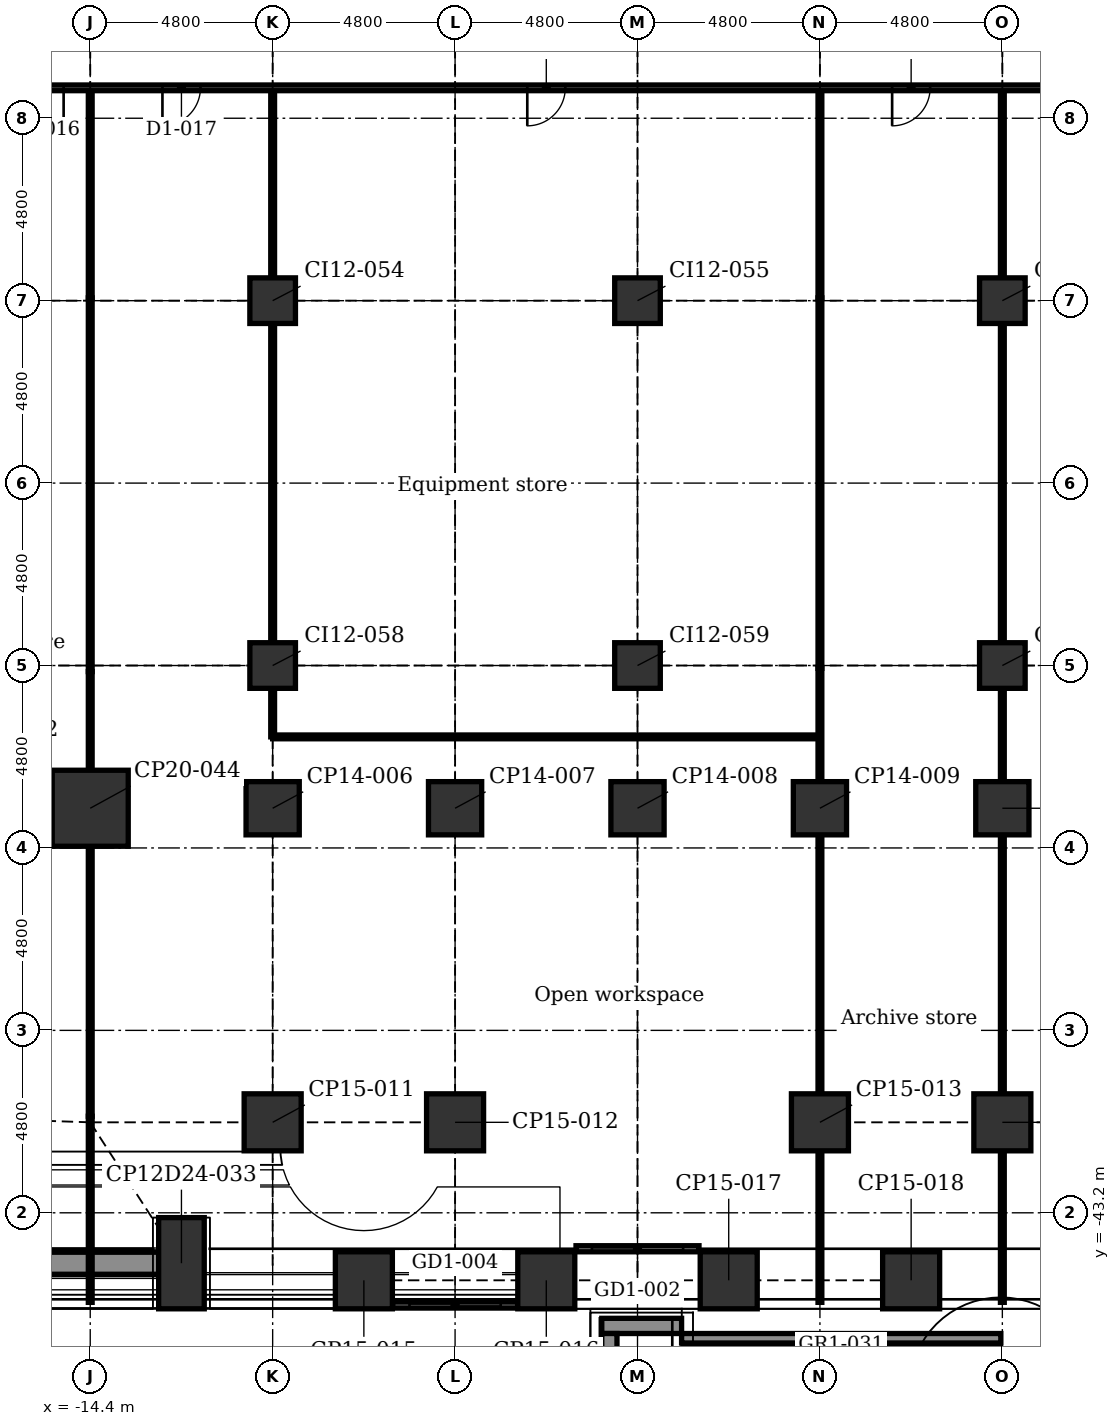
"""IFC4 building model, lengths in metres.
Left out: names, types, materials, properties, quantities, classifications, styles, units other than length and angle.
Written with IfcOpenShell. Run it as: python <this file> out.ifc"""

import sys

from ifc_helpers import new_model, si_unit, direction, frame, frame_2d, origin, origin_2d, place, context, subcontext, project, spatial, polyline, rectangle, outline, extrude, element, fill, save


model = new_model("IFC4")
c1 = context("Model", 3, precision=1e-05, world=origin(), true_north=direction((0.0, 1.0)))
c2 = subcontext(c1, "Body", "Model", "MODEL_VIEW")
j1 = project(units=[si_unit("LENGTHUNIT", "METRE"), si_unit("PLANEANGLEUNIT", "RADIAN")], contexts=[c1])
p1 = place(None, origin())
s1 = spatial("IfcSite", under=j1, at=p1, CompositionType="ELEMENT")
p2 = place(p1, origin())
s2 = spatial("IfcBuilding", under=s1, at=p2, CompositionType="ELEMENT")
p3 = place(p2, frame((0.0, 0.0, 7.0)))
s3 = spatial("IfcBuildingStorey", under=s2, at=p3, CompositionType="ELEMENT", Elevation=7.0)
for number, where, z_axis, x_axis in (
    (1, (7.2, -44.976, -0.3), (0.0, 0.0, 1.0), (1.0, 0.0, 0.0)),
    (2, (2.4, -44.976, -0.3), (0.0, 0.0, 1.0), (1.0, 0.0, 0.0)),
    (3, (-2.4, -44.976, -0.3), (0.0, 0.0, 1.0), (1.0, 0.0, 0.0)),
    (4, (-7.2, -44.976, -0.3), (0.0, 0.0, 1.0), (1.0, 0.0, 0.0)),
):
    element("IfcColumn", number, at=place(p3, frame(where, z_axis=z_axis, x_axis=x_axis)), inside=s3, PredefinedType="COLUMN", context=c2, shape_type="SweptSolid", body=[
        extrude(rectangle(XDim=1.5, YDim=1.5, at=origin_2d()), origin(), (0.0, 0.0, 1.0), 5.4),
    ])
p4 = place(p3, frame((-12.0, -44.526, -0.3), z_axis=(0.0, 0.0, 1.0), x_axis=(1.0, 0.0, 0.0)))
e5 = element("IfcColumn", 5, at=p4, inside=s3, PredefinedType="COLUMN", context=c2, shape_type="SweptSolid", body=[
    extrude(rectangle(XDim=1.2, YDim=2.4, at=origin_2d()), origin(), (0.0, 0.0, 1.0), 5.4),
])
for number, where, z_axis, x_axis in (
    (6, (9.6, -40.819, -0.3), (0.0, 0.0, 1.0), (1.0, 0.0, 0.0)),
    (7, (4.8, -40.819, -0.3), (0.0, 0.0, 1.0), (1.0, 0.0, 0.0)),
    (8, (-4.8, -40.819, -0.3), (0.0, 0.0, 1.0), (1.0, 0.0, 0.0)),
    (9, (-9.6, -40.819, -0.3), (0.0, 0.0, 1.0), (1.0, 0.0, 0.0)),
):
    element("IfcColumn", number, at=place(p3, frame(where, z_axis=z_axis, x_axis=x_axis)), inside=s3, PredefinedType="COLUMN", context=c2, shape_type="SweptSolid", body=[
        extrude(rectangle(XDim=1.5, YDim=1.5, at=origin_2d()), origin(), (0.0, 0.0, 1.0), 5.4),
    ])
p5 = place(p3, frame((-14.4, -32.555, -0.3), z_axis=(0.0, 0.0, 1.0), x_axis=(1.0, 0.0, 0.0)))
e10 = element("IfcColumn", 10, at=p5, inside=s3, PredefinedType="COLUMN", context=c2, shape_type="SweptSolid", body=[
    extrude(rectangle(XDim=2.0, YDim=2.0, at=origin_2d()), origin(), (0.0, 0.0, 1.0), 5.4),
])
for number, where, z_axis, x_axis in (
    (11, (9.6, -32.555, -0.3), (0.0, 0.0, 1.0), (1.0, 0.0, 0.0)),
    (12, (4.8, -32.555, -0.3), (0.0, 0.0, 1.0), (1.0, 0.0, 0.0)),
    (13, (0.0, -32.555, -0.3), (0.0, 0.0, 1.0), (1.0, 0.0, 0.0)),
    (14, (-4.8, -32.555, -0.3), (0.0, 0.0, 1.0), (1.0, 0.0, 0.0)),
    (15, (-9.6, -32.555, -0.3), (0.0, 0.0, 1.0), (1.0, 0.0, 0.0)),
):
    element("IfcColumn", number, at=place(p3, frame(where, z_axis=z_axis, x_axis=x_axis)), inside=s3, PredefinedType="COLUMN", context=c2, shape_type="SweptSolid", body=[
        extrude(rectangle(XDim=1.4, YDim=1.4, at=origin_2d()), origin(), (0.0, 0.0, 1.0), 5.4),
    ])
for number, where, z_axis, x_axis in (
    (16, (-9.6, -28.8, -0.3), (0.0, 0.0, 1.0), (1.0, 0.0, 0.0)),
    (17, (-9.6, -19.2, -0.3), (0.0, 0.0, 1.0), (1.0, 0.0, 0.0)),
    (18, (0.0, -28.8, -0.3), (0.0, 0.0, 1.0), (1.0, 0.0, 0.0)),
    (19, (0.0, -19.2, -0.3), (0.0, 0.0, 1.0), (1.0, 0.0, 0.0)),
    (20, (9.6, -28.8, -0.3), (0.0, 0.0, 1.0), (1.0, 0.0, 0.0)),
    (21, (9.6, -19.2, -0.3), (0.0, 0.0, 1.0), (1.0, 0.0, 0.0)),
):
    element("IfcColumn", number, at=place(p3, frame(where, z_axis=z_axis, x_axis=x_axis)), inside=s3, PredefinedType="COLUMN", context=c2, shape_type="SweptSolid", body=[
        extrude(rectangle(XDim=1.2, YDim=1.2, at=origin_2d()), origin(), (0.0, 0.0, 1.0), 5.4),
    ])
p6 = place(p3, frame((1.618, -44.146, 0.0), z_axis=(0.0, 0.0, 1.0), x_axis=(-1.0, 0.0, 0.0)))
e22 = element("IfcWall", 22, at=p6, inside=s3, PredefinedType="PARTITIONING", context=c2, shape_type="SweptSolid", body=[
    extrude(rectangle(XDim=3.236, YDim=0.16, at=frame_2d((1.618, 0.0))), origin(), (0.0, 0.0, 1.0), 5.1),
])
p7 = place(p6, frame((0.418, 0.0, 0.0)))
e23 = element("IfcOpeningElement", 23, at=p7, cuts=e22, PredefinedType="OPENING", context=c2, shape_type="SweptSolid", body=[
    extrude(rectangle(XDim=2.4, YDim=2.4, at=frame_2d((1.2, 1.2))), frame((0.0, 0.09, 0.0), z_axis=(0.0, -1.0, 0.0), x_axis=(1.0, 0.0, 0.0)), (0.0, 0.0, 1.0), 0.18),
])
p8 = place(p3, frame((-3.154, -45.626, 0.0), z_axis=(0.0, 0.0, 1.0), x_axis=(-1.0, 0.0, 0.0)))
e24 = element("IfcWall", 24, at=p8, inside=s3, PredefinedType="PARTITIONING", context=c2, shape_type="SweptSolid", body=[
    extrude(rectangle(XDim=3.292, YDim=0.16, at=frame_2d((1.646, 0.0))), origin(), (0.0, 0.0, 1.0), 5.1),
])
p9 = place(p8, frame((0.446, 0.0, 0.0)))
e25 = element("IfcOpeningElement", 25, at=p9, cuts=e24, PredefinedType="OPENING", context=c2, shape_type="SweptSolid", body=[
    extrude(rectangle(XDim=2.4, YDim=2.4, at=frame_2d((1.2, 1.2))), frame((0.0, 0.09, 0.0), z_axis=(0.0, -1.0, 0.0), x_axis=(1.0, 0.0, 0.0)), (0.0, 0.0, 1.0), 0.18),
])
p10 = place(p3, frame((-12.294, -44.526, 5.4), z_axis=(0.0, 0.0, 1.0), x_axis=(-1.0, 0.0, 0.0)))
e26 = element("IfcWall", 26, at=p10, inside=s3, PredefinedType="USERDEFINED", context=c2, shape_type="SweptSolid", body=[
    extrude(rectangle(XDim=6.0, YDim=0.6, at=frame_2d((3.0, 0.0))), origin(), (0.0, 0.0, 1.0), 0.7),
])
p11 = place(p3, frame((9.56, -46.501, 0.0), z_axis=(0.0, 0.0, 1.0), x_axis=(-1.0, 0.0, 0.0)))
e27 = element("IfcWall", 27, at=p11, inside=s3, PredefinedType="SOLIDWALL", context=c2, shape_type="SweptSolid", body=[
    extrude(outline(polyline([(0.0, 0.0), (8.4, 0.0), (8.4, 5.5), (0.0, 0.274), (0.0, 0.0)])), frame((0.0, 0.125, 0.0), z_axis=(0.0, -1.0, 0.0), x_axis=(1.0, 0.0, 0.0)), (0.0, 0.0, 1.0), 0.25),
])
p12 = place(p3, frame((1.16, -46.176, 0.45), z_axis=(0.0, 0.0, 1.0), x_axis=(-1.0, 0.0, 0.0)))
e28 = element("IfcWall", 28, at=p12, inside=s3, PredefinedType="SOLIDWALL", context=c2, shape_type="SweptSolid", body=[
    extrude(rectangle(XDim=2.1, YDim=0.4, at=frame_2d((1.05, 0.0))), origin(), (0.0, 0.0, 1.0), 4.75),
])
p13 = place(p3, frame((-0.74, -46.376, 0.45), z_axis=(0.0, 0.0, 1.0), x_axis=(0.0, -1.0, 0.0)))
e29 = element("IfcWall", 29, at=p13, inside=s3, PredefinedType="SOLIDWALL", context=c2, shape_type="SweptSolid", body=[
    extrude(rectangle(XDim=2.25, YDim=0.4, at=frame_2d((1.125, 0.0))), origin(), (0.0, 0.0, 1.0), 4.75),
])
p14 = place(p3, frame((9.6, -28.24, 0.0), z_axis=(0.0, 0.0, 1.0), x_axis=(0.0, 1.0, 0.0)))
e30 = element("IfcWall", 30, at=p14, inside=s3, PredefinedType="PARTITIONING", context=c2, shape_type="SweptSolid", body=[
    extrude(rectangle(XDim=8.48, YDim=0.1, at=frame_2d((4.24, 0.0))), origin(), (0.0, 0.0, 1.0), 4.693),
])
p15 = place(p3, frame((9.6, -45.556, 0.0), z_axis=(0.0, 0.0, 1.0), x_axis=(0.0, 1.0, 0.0)))
e31 = element("IfcWall", 31, at=p15, inside=s3, PredefinedType="PARTITIONING", context=c2, shape_type="SweptSolid", body=[
    extrude(rectangle(XDim=5.447, YDim=0.1, at=frame_2d((2.724, 0.0))), origin(), (0.0, 0.0, 1.0), 5.1),
])
p16 = place(p3, frame((9.6, -40.109, 0.0), z_axis=(0.0, 0.0, 1.0), x_axis=(0.0, 1.0, 0.0)))
e32 = element("IfcWall", 32, at=p16, inside=s3, PredefinedType="PARTITIONING", context=c2, shape_type="SweptSolid", body=[
    extrude(rectangle(XDim=6.894, YDim=0.1, at=frame_2d((3.447, 0.0))), origin(), (0.0, 0.0, 1.0), 4.79),
])
p17 = place(p3, frame((9.6, -33.215, 0.0), z_axis=(0.0, 0.0, 1.0), x_axis=(0.0, 1.0, 0.0)))
e33 = element("IfcWall", 33, at=p17, inside=s3, PredefinedType="PARTITIONING", context=c2, shape_type="SweptSolid", body=[
    extrude(rectangle(XDim=1.32, YDim=0.1, at=frame_2d((0.66, 0.0))), origin(), (0.0, 0.0, 1.0), 5.1),
])
p18 = place(p3, frame((9.6, -31.896, 0.0), z_axis=(0.0, 0.0, 1.0), x_axis=(0.0, 1.0, 0.0)))
e34 = element("IfcWall", 34, at=p18, inside=s3, PredefinedType="PARTITIONING", context=c2, shape_type="SweptSolid", body=[
    extrude(rectangle(XDim=2.535, YDim=0.1, at=frame_2d((1.268, 0.0))), origin(), (0.0, 0.0, 1.0), 4.79),
])
for number, where, z_axis, x_axis in (
    (35, (9.6, -29.36, 0.0), (0.0, 0.0, 1.0), (0.0, 1.0, 0.0)),
    (36, (9.6, -19.76, 0.0), (0.0, 0.0, 1.0), (0.0, 1.0, 0.0)),
):
    element("IfcWall", number, at=place(p3, frame(where, z_axis=z_axis, x_axis=x_axis)), inside=s3, PredefinedType="PARTITIONING", context=c2, shape_type="SweptSolid", body=[
        extrude(rectangle(XDim=1.12, YDim=0.1, at=frame_2d((0.56, 0.0))), origin(), (0.0, 0.0, 1.0), 5.1),
    ])
p19 = place(p3, frame((9.6, -18.64, 0.0), z_axis=(0.0, 0.0, 1.0), x_axis=(0.0, 1.0, 0.0)))
e37 = element("IfcWall", 37, at=p19, inside=s3, PredefinedType="PARTITIONING", context=c2, shape_type="SweptSolid", body=[
    extrude(rectangle(XDim=5.04, YDim=0.1, at=frame_2d((2.52, 0.0))), origin(), (0.0, 0.0, 1.0), 4.693),
])
p20 = place(p3, frame((4.8, -28.874, 0.0), z_axis=(0.0, 0.0, 1.0), x_axis=(0.0, 1.0, 0.0)))
e38 = element("IfcWall", 38, at=p20, inside=s3, PredefinedType="PARTITIONING", context=c2, shape_type="SweptSolid", body=[
    extrude(rectangle(XDim=9.748, YDim=0.1, at=frame_2d((4.874, 0.0))), origin(), (0.0, 0.0, 1.0), 4.643),
])
p21 = place(p3, frame((4.8, -45.556, 0.0), z_axis=(0.0, 0.0, 1.0), x_axis=(0.0, 1.0, 0.0)))
e39 = element("IfcWall", 39, at=p21, inside=s3, PredefinedType="PARTITIONING", context=c2, shape_type="SweptSolid", body=[
    extrude(rectangle(XDim=5.447, YDim=0.1, at=frame_2d((2.724, 0.0))), origin(), (0.0, 0.0, 1.0), 5.1),
])
p22 = place(p3, frame((4.8, -40.109, 0.0), z_axis=(0.0, 0.0, 1.0), x_axis=(0.0, 1.0, 0.0)))
e40 = element("IfcWall", 40, at=p22, inside=s3, PredefinedType="PARTITIONING", context=c2, shape_type="SweptSolid", body=[
    extrude(rectangle(XDim=6.894, YDim=0.1, at=frame_2d((3.447, 0.0))), origin(), (0.0, 0.0, 1.0), 4.79),
])
p23 = place(p3, frame((4.8, -33.215, 0.0), z_axis=(0.0, 0.0, 1.0), x_axis=(0.0, 1.0, 0.0)))
e41 = element("IfcWall", 41, at=p23, inside=s3, PredefinedType="PARTITIONING", context=c2, shape_type="SweptSolid", body=[
    extrude(rectangle(XDim=1.32, YDim=0.1, at=frame_2d((0.66, 0.0))), origin(), (0.0, 0.0, 1.0), 5.1),
])
p24 = place(p3, frame((4.8, -31.896, 0.0), z_axis=(0.0, 0.0, 1.0), x_axis=(0.0, 1.0, 0.0)))
e42 = element("IfcWall", 42, at=p24, inside=s3, PredefinedType="PARTITIONING", context=c2, shape_type="SweptSolid", body=[
    extrude(rectangle(XDim=3.021, YDim=0.1, at=frame_2d((1.511, 0.0))), origin(), (0.0, 0.0, 1.0), 4.79),
])
p25 = place(p3, frame((4.8, -19.126, 0.0), z_axis=(0.0, 0.0, 1.0), x_axis=(0.0, 1.0, 0.0)))
e43 = element("IfcWall", 43, at=p25, inside=s3, PredefinedType="PARTITIONING", context=c2, shape_type="SweptSolid", body=[
    extrude(rectangle(XDim=5.526, YDim=0.1, at=frame_2d((2.763, 0.0))), origin(), (0.0, 0.0, 1.0), 4.693),
])
p26 = place(p3, frame((-9.6, -28.24, 0.0), z_axis=(0.0, 0.0, 1.0), x_axis=(0.0, 1.0, 0.0)))
e44 = element("IfcWall", 44, at=p26, inside=s3, PredefinedType="PARTITIONING", context=c2, shape_type="SweptSolid", body=[
    extrude(rectangle(XDim=8.48, YDim=0.1, at=frame_2d((4.24, 0.0))), origin(), (0.0, 0.0, 1.0), 4.693),
])
p27 = place(p3, frame((-9.6, -30.678, 0.0), z_axis=(0.0, 0.0, 1.0), x_axis=(0.0, 1.0, 0.0)))
e45 = element("IfcWall", 45, at=p27, inside=s3, PredefinedType="PARTITIONING", context=c2, shape_type="SweptSolid", body=[
    extrude(rectangle(XDim=1.318, YDim=0.1, at=frame_2d((0.659, 0.0))), origin(), (0.0, 0.0, 1.0), 4.79),
])
for number, where, z_axis, x_axis in (
    (46, (-9.6, -29.36, 0.0), (0.0, 0.0, 1.0), (0.0, 1.0, 0.0)),
    (47, (-9.6, -19.76, 0.0), (0.0, 0.0, 1.0), (0.0, 1.0, 0.0)),
):
    element("IfcWall", number, at=place(p3, frame(where, z_axis=z_axis, x_axis=x_axis)), inside=s3, PredefinedType="PARTITIONING", context=c2, shape_type="SweptSolid", body=[
        extrude(rectangle(XDim=1.12, YDim=0.1, at=frame_2d((0.56, 0.0))), origin(), (0.0, 0.0, 1.0), 5.1),
    ])
p28 = place(p3, frame((-9.6, -18.64, 0.0), z_axis=(0.0, 0.0, 1.0), x_axis=(0.0, 1.0, 0.0)))
e48 = element("IfcWall", 48, at=p28, inside=s3, PredefinedType="PARTITIONING", context=c2, shape_type="SweptSolid", body=[
    extrude(rectangle(XDim=5.04, YDim=0.1, at=frame_2d((2.52, 0.0))), origin(), (0.0, 0.0, 1.0), 4.693),
])
p29 = place(p3, frame((-14.4, -28.96, 0.0), z_axis=(0.0, 0.0, 1.0), x_axis=(0.0, 1.0, 0.0)))
e49 = element("IfcWall", 49, at=p29, inside=s3, PredefinedType="PARTITIONING", context=c2, shape_type="SweptSolid", body=[
    extrude(rectangle(XDim=9.834, YDim=0.1, at=frame_2d((4.917, 0.0))), origin(), (0.0, 0.0, 1.0), 4.643),
])
p30 = place(p3, frame((-14.4, -45.556, 0.0), z_axis=(0.0, 0.0, 1.0), x_axis=(0.0, 1.0, 0.0)))
e50 = element("IfcWall", 50, at=p30, inside=s3, PredefinedType="PARTITIONING", context=c2, shape_type="SweptSolid", body=[
    extrude(rectangle(XDim=4.897, YDim=0.1, at=frame_2d((2.448, 0.0))), origin(), (0.0, 0.0, 1.0), 5.1),
])
p31 = place(p3, frame((-14.4, -40.659, 0.0), z_axis=(0.0, 0.0, 1.0), x_axis=(0.0, 1.0, 0.0)))
e51 = element("IfcWall", 51, at=p31, inside=s3, PredefinedType="PARTITIONING", context=c2, shape_type="SweptSolid", body=[
    extrude(rectangle(XDim=7.144, YDim=0.1, at=frame_2d((3.572, 0.0))), origin(), (0.0, 0.0, 1.0), 4.745),
])
p32 = place(p3, frame((-14.4, -33.515, 0.0), z_axis=(0.0, 0.0, 1.0), x_axis=(0.0, 1.0, 0.0)))
e52 = element("IfcWall", 52, at=p32, inside=s3, PredefinedType="PARTITIONING", context=c2, shape_type="SweptSolid", body=[
    extrude(rectangle(XDim=1.92, YDim=0.1, at=frame_2d((0.96, 0.0))), origin(), (0.0, 0.0, 1.0), 5.1),
])
p33 = place(p3, frame((-14.4, -31.595, 0.0), z_axis=(0.0, 0.0, 1.0), x_axis=(0.0, 1.0, 0.0)))
e53 = element("IfcWall", 53, at=p33, inside=s3, PredefinedType="PARTITIONING", context=c2, shape_type="SweptSolid", body=[
    extrude(rectangle(XDim=2.635, YDim=0.1, at=frame_2d((1.318, 0.0))), origin(), (0.0, 0.0, 1.0), 4.79),
])
p34 = place(p3, frame((-14.4, -19.126, 0.0), z_axis=(0.0, 0.0, 1.0), x_axis=(0.0, 1.0, 0.0)))
e54 = element("IfcWall", 54, at=p34, inside=s3, PredefinedType="PARTITIONING", context=c2, shape_type="SweptSolid", body=[
    extrude(rectangle(XDim=5.526, YDim=0.1, at=frame_2d((2.763, 0.0))), origin(), (0.0, 0.0, 1.0), 4.693),
])
p35 = place(p3, frame((-9.6, -30.678, 0.0), z_axis=(0.0, 0.0, 1.0), x_axis=(1.0, 0.0, 0.0)))
e55 = element("IfcWall", 55, at=p35, inside=s3, PredefinedType="PARTITIONING", context=c2, shape_type="SweptSolid", body=[
    extrude(rectangle(XDim=14.4, YDim=0.1, at=frame_2d((7.2, 0.0))), origin(), (0.0, 0.0, 1.0), 5.1),
])
p36 = place(p3, frame((-16.8, -13.6, 0.0), z_axis=(0.0, 0.0, 1.0), x_axis=(1.0, 0.0, 0.0)))
e56 = element("IfcWall", 56, at=p36, inside=s3, PredefinedType="PARTITIONING", context=c2, shape_type="SweptSolid", body=[
    extrude(rectangle(XDim=33.6, YDim=0.15, at=frame_2d((16.8, 0.0))), origin(), (0.0, 0.0, 1.0), 5.1),
])
p37 = place(p36, frame((0.7, 0.0, 0.0)))
e57 = element("IfcOpeningElement", 57, at=p37, cuts=e56, PredefinedType="OPENING", context=c2, shape_type="SweptSolid", body=[
    extrude(rectangle(XDim=1.0, YDim=2.1, at=frame_2d((0.5, 1.05))), frame((0.0, 0.085, 0.0), z_axis=(0.0, -1.0, 0.0), x_axis=(1.0, 0.0, 0.0)), (0.0, 0.0, 1.0), 0.17),
])
p38 = place(p36, frame((4.3, 0.0, 0.0)))
e58 = element("IfcOpeningElement", 58, at=p38, cuts=e56, PredefinedType="OPENING", context=c2, shape_type="SweptSolid", body=[
    extrude(rectangle(XDim=1.0, YDim=2.1, at=frame_2d((0.5, 1.05))), frame((0.0, 0.085, 0.0), z_axis=(0.0, -1.0, 0.0), x_axis=(1.0, 0.0, 0.0)), (0.0, 0.0, 1.0), 0.17),
])
p39 = place(p36, frame((13.9, 0.0, 0.0)))
e59 = element("IfcOpeningElement", 59, at=p39, cuts=e56, PredefinedType="OPENING", context=c2, shape_type="SweptSolid", body=[
    extrude(rectangle(XDim=1.0, YDim=2.1, at=frame_2d((0.5, 1.05))), frame((0.0, 0.085, 0.0), z_axis=(0.0, -1.0, 0.0), x_axis=(1.0, 0.0, 0.0)), (0.0, 0.0, 1.0), 0.17),
])
p40 = place(p36, frame((23.5, 0.0, 0.0)))
e60 = element("IfcOpeningElement", 60, at=p40, cuts=e56, PredefinedType="OPENING", context=c2, shape_type="SweptSolid", body=[
    extrude(rectangle(XDim=1.0, YDim=2.1, at=frame_2d((0.5, 1.05))), frame((0.0, 0.085, 0.0), z_axis=(0.0, -1.0, 0.0), x_axis=(1.0, 0.0, 0.0)), (0.0, 0.0, 1.0), 0.17),
])
p41 = place(p36, frame((28.425, 0.0, 0.0)))
e61 = element("IfcOpeningElement", 61, at=p41, cuts=e56, PredefinedType="OPENING", context=c2, shape_type="SweptSolid", body=[
    extrude(rectangle(XDim=1.8, YDim=2.1, at=frame_2d((0.9, 1.05))), frame((0.0, 0.085, 0.0), z_axis=(0.0, -1.0, 0.0), x_axis=(1.0, 0.0, 0.0)), (0.0, 0.0, 1.0), 0.17),
])
p42 = place(p36, frame((31.9, 0.0, 0.0)))
e62 = element("IfcOpeningElement", 62, at=p42, cuts=e56, PredefinedType="OPENING", context=c2, shape_type="SweptSolid", body=[
    extrude(rectangle(XDim=1.0, YDim=2.1, at=frame_2d((0.5, 1.05))), frame((0.0, 0.085, 0.0), z_axis=(0.0, -1.0, 0.0), x_axis=(1.0, 0.0, 0.0)), (0.0, 0.0, 1.0), 0.17),
])
p43 = place(p7, origin())
e63 = element("IfcDoor", 63, at=p43, inside=s3, OperationType="DOUBLE_DOOR_SLIDING", PredefinedType="DOOR", context=c2, shape_type="SweptSolid", body=[
    extrude(rectangle(XDim=2.4, YDim=2.4, at=frame_2d((1.2, 1.2))), frame((0.0, 0.025, 0.0), z_axis=(0.0, -1.0, 0.0), x_axis=(1.0, 0.0, 0.0)), (0.0, 0.0, 1.0), 0.05),
])
fill(e23, e63)
p44 = place(p9, origin())
e64 = element("IfcDoor", 64, at=p44, inside=s3, OperationType="DOUBLE_DOOR_SLIDING", PredefinedType="DOOR", context=c2, shape_type="SweptSolid", body=[
    extrude(rectangle(XDim=2.4, YDim=2.4, at=frame_2d((1.2, 1.2))), frame((0.0, 0.025, 0.0), z_axis=(0.0, -1.0, 0.0), x_axis=(1.0, 0.0, 0.0)), (0.0, 0.0, 1.0), 0.05),
])
fill(e25, e64)
p45 = place(p37, frame((1.0, 0.0, 0.0), z_axis=(0.0, 0.0, 1.0), x_axis=(-1.0, 0.0, 0.0)))
e65 = element("IfcDoor", 65, at=p45, inside=s3, OperationType="SINGLE_SWING_RIGHT", PredefinedType="DOOR", context=c2, shape_type="SweptSolid", body=[
    extrude(rectangle(XDim=1.0, YDim=2.1, at=frame_2d((0.5, 1.05))), frame((0.0, 0.025, 0.0), z_axis=(0.0, -1.0, 0.0), x_axis=(1.0, 0.0, 0.0)), (0.0, 0.0, 1.0), 0.05),
])
fill(e57, e65)
p46 = place(p38, frame((1.0, 0.0, 0.0), z_axis=(0.0, 0.0, 1.0), x_axis=(-1.0, 0.0, 0.0)))
e66 = element("IfcDoor", 66, at=p46, inside=s3, OperationType="SINGLE_SWING_LEFT", PredefinedType="DOOR", context=c2, shape_type="SweptSolid", body=[
    extrude(rectangle(XDim=1.0, YDim=2.1, at=frame_2d((0.5, 1.05))), frame((0.0, 0.025, 0.0), z_axis=(0.0, -1.0, 0.0), x_axis=(1.0, 0.0, 0.0)), (0.0, 0.0, 1.0), 0.05),
])
fill(e58, e66)
p47 = place(p39, frame((1.0, 0.0, 0.0), z_axis=(0.0, 0.0, 1.0), x_axis=(-1.0, 0.0, 0.0)))
e67 = element("IfcDoor", 67, at=p47, inside=s3, OperationType="SINGLE_SWING_LEFT", PredefinedType="DOOR", context=c2, shape_type="SweptSolid", body=[
    extrude(rectangle(XDim=1.0, YDim=2.1, at=frame_2d((0.5, 1.05))), frame((0.0, 0.025, 0.0), z_axis=(0.0, -1.0, 0.0), x_axis=(1.0, 0.0, 0.0)), (0.0, 0.0, 1.0), 0.05),
])
fill(e59, e67)
p48 = place(p40, frame((1.0, 0.0, 0.0), z_axis=(0.0, 0.0, 1.0), x_axis=(-1.0, 0.0, 0.0)))
e68 = element("IfcDoor", 68, at=p48, inside=s3, OperationType="SINGLE_SWING_LEFT", PredefinedType="DOOR", context=c2, shape_type="SweptSolid", body=[
    extrude(rectangle(XDim=1.0, YDim=2.1, at=frame_2d((0.5, 1.05))), frame((0.0, 0.025, 0.0), z_axis=(0.0, -1.0, 0.0), x_axis=(1.0, 0.0, 0.0)), (0.0, 0.0, 1.0), 0.05),
])
fill(e60, e68)
save(model, sys.argv[1])
